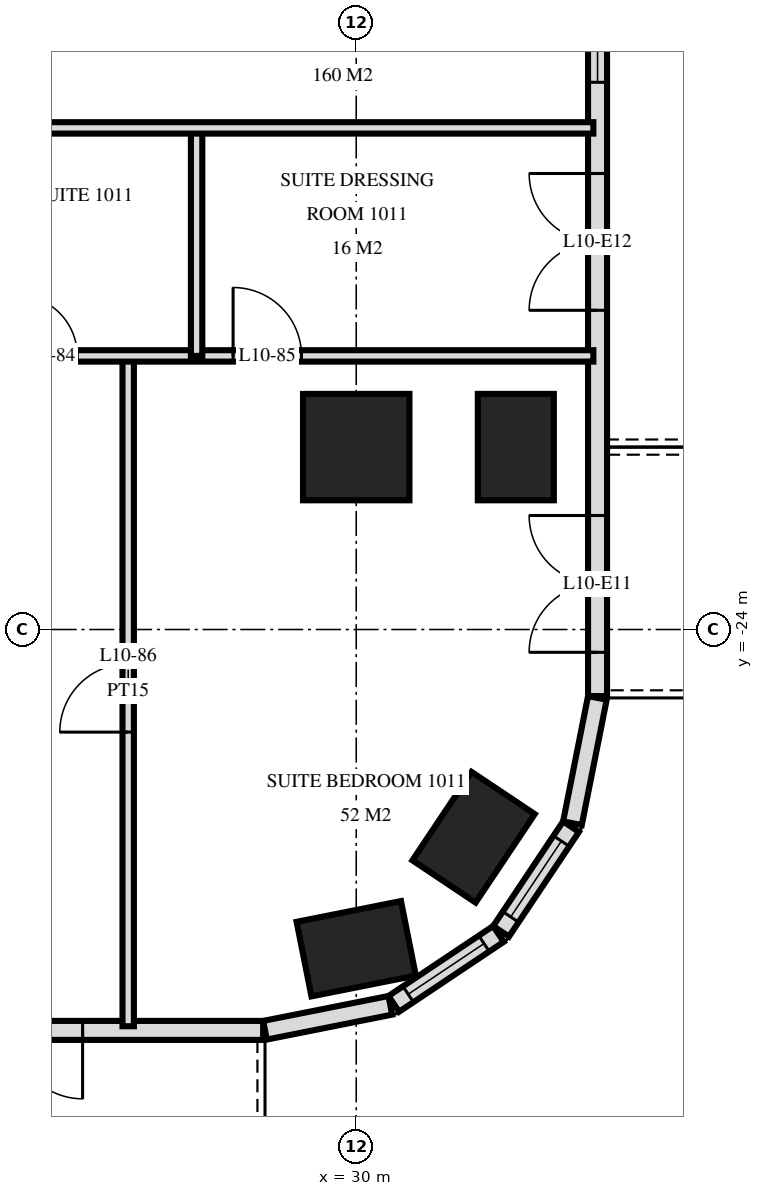
"""IFC4 building model, lengths in metres.
Left out: names, types, materials, properties, quantities, classifications, styles, units other than length and angle.
Written with IfcOpenShell. Run it as: python <this file> out.ifc"""

import sys

from ifc_helpers import new_model, si_unit, direction, frame, frame_2d, origin, origin_2d, place, context, subcontext, project, spatial, rectangle, extrude, element, fill, save


model = new_model("IFC4")
c1 = context("Model", 3, precision=1e-05, world=origin(), true_north=direction((0.0, 1.0)))
c2 = subcontext(c1, "Body", "Model", "MODEL_VIEW")
j1 = project(units=[si_unit("LENGTHUNIT", "METRE"), si_unit("PLANEANGLEUNIT", "RADIAN")], contexts=[c1])
p1 = place(None, origin())
s1 = spatial("IfcSite", under=j1, at=p1, CompositionType="ELEMENT")
p2 = place(p1, origin())
s2 = spatial("IfcBuilding", under=s1, at=p2, CompositionType="ELEMENT")
p3 = place(p2, frame((0.0, 0.0, 45.6)))
s3 = spatial("IfcBuildingStorey", under=s2, at=p3, CompositionType="ELEMENT", Elevation=45.6)
p4 = place(p3, frame((30.0, -28.2, 0.0), z_axis=(0.0, 0.0, 1.0), x_axis=(0.980792089743, 0.195056086032, 0.0)))
e1 = element("IfcColumn", 1, at=p4, inside=s3, PredefinedType="COLUMN", context=c2, shape_type="SweptSolid", body=[
    extrude(rectangle(XDim=1.4, YDim=1.0, at=origin_2d()), origin(), (0.0, 0.0, 1.0), 3.6),
])
p5 = place(p3, frame((30.0, -21.6, 0.0), z_axis=(0.0, 0.0, 1.0), x_axis=(1.0, 0.0, 0.0)))
e2 = element("IfcColumn", 2, at=p5, inside=s3, PredefinedType="COLUMN", context=c2, shape_type="SweptSolid", body=[
    extrude(rectangle(XDim=1.4, YDim=1.4, at=origin_2d()), origin(), (0.0, 0.0, 1.0), 3.6),
])
for number, where, z_axis, x_axis in (
    (3, (31.544, -26.733, 0.0), (0.0, 0.0, 1.0), (0.556, 0.831, 0.0)),
    (4, (32.1, -21.6, 0.0), (0.0, 0.0, 1.0), (0.0, 1.0, 0.0)),
):
    element("IfcColumn", number, at=place(p3, frame(where, z_axis=z_axis, x_axis=x_axis)), inside=s3, PredefinedType="COLUMN", context=c2, shape_type="SweptSolid", body=[
        extrude(rectangle(XDim=1.4, YDim=1.0, at=origin_2d()), origin(), (0.0, 0.0, 1.0), 3.6),
    ])
p6 = place(p3, frame((-28.775, -29.275, 0.0), z_axis=(0.0, 0.0, 1.0), x_axis=(1.0, 0.0, 0.0)))
e5 = element("IfcWall", 5, at=p6, inside=s3, PredefinedType="SOLIDWALL", context=c2, shape_type="SweptSolid", body=[
    extrude(rectangle(XDim=57.551, YDim=0.25, at=frame_2d((28.775, 0.0))), origin(), (0.0, 0.0, 1.0), 3.32),
])
p7 = place(p6, frame((0.575, 0.0, 0.0)))
e6 = element("IfcOpeningElement", 6, at=p7, cuts=e5, PredefinedType="OPENING", context=c2, shape_type="SweptSolid", body=[
    extrude(rectangle(XDim=1.8, YDim=2.4, at=frame_2d((0.9, 1.2))), frame((0.0, 0.135, 0.0), z_axis=(0.0, -1.0, 0.0), x_axis=(1.0, 0.0, 0.0)), (0.0, 0.0, 1.0), 0.27),
])
p8 = place(p6, frame((5.375, 0.0, 0.0)))
e7 = element("IfcOpeningElement", 7, at=p8, cuts=e5, PredefinedType="OPENING", context=c2, shape_type="SweptSolid", body=[
    extrude(rectangle(XDim=1.8, YDim=2.4, at=frame_2d((0.9, 1.2))), frame((0.0, 0.135, 0.0), z_axis=(0.0, -1.0, 0.0), x_axis=(1.0, 0.0, 0.0)), (0.0, 0.0, 1.0), 0.27),
])
p9 = place(p6, frame((8.075, 0.0, 0.3)))
e8 = element("IfcOpeningElement", 8, at=p9, cuts=e5, PredefinedType="OPENING", context=c2, shape_type="SweptSolid", body=[
    extrude(rectangle(XDim=2.4, YDim=2.1, at=frame_2d((1.2, 1.05))), frame((0.0, 0.135, 0.0), z_axis=(0.0, -1.0, 0.0), x_axis=(1.0, 0.0, 0.0)), (0.0, 0.0, 1.0), 0.27),
])
p10 = place(p6, frame((12.875, 0.0, 0.0)))
e9 = element("IfcOpeningElement", 9, at=p10, cuts=e5, PredefinedType="OPENING", context=c2, shape_type="SweptSolid", body=[
    extrude(rectangle(XDim=1.8, YDim=2.4, at=frame_2d((0.9, 1.2))), frame((0.0, 0.135, 0.0), z_axis=(0.0, -1.0, 0.0), x_axis=(1.0, 0.0, 0.0)), (0.0, 0.0, 1.0), 0.27),
])
p11 = place(p6, frame((17.375, 0.0, 0.0)))
e10 = element("IfcOpeningElement", 10, at=p11, cuts=e5, PredefinedType="OPENING", context=c2, shape_type="SweptSolid", body=[
    extrude(rectangle(XDim=1.8, YDim=2.4, at=frame_2d((0.9, 1.2))), frame((0.0, 0.135, 0.0), z_axis=(0.0, -1.0, 0.0), x_axis=(1.0, 0.0, 0.0)), (0.0, 0.0, 1.0), 0.27),
])
p12 = place(p6, frame((20.075, 0.0, 0.3)))
e11 = element("IfcOpeningElement", 11, at=p12, cuts=e5, PredefinedType="OPENING", context=c2, shape_type="SweptSolid", body=[
    extrude(rectangle(XDim=2.4, YDim=2.1, at=frame_2d((1.2, 1.05))), frame((0.0, 0.135, 0.0), z_axis=(0.0, -1.0, 0.0), x_axis=(1.0, 0.0, 0.0)), (0.0, 0.0, 1.0), 0.27),
])
p13 = place(p6, frame((23.075, 0.0, 0.3)))
e12 = element("IfcOpeningElement", 12, at=p13, cuts=e5, PredefinedType="OPENING", context=c2, shape_type="SweptSolid", body=[
    extrude(rectangle(XDim=2.4, YDim=2.1, at=frame_2d((1.2, 1.05))), frame((0.0, 0.135, 0.0), z_axis=(0.0, -1.0, 0.0), x_axis=(1.0, 0.0, 0.0)), (0.0, 0.0, 1.0), 0.27),
])
p14 = place(p6, frame((26.375, 0.0, 0.0)))
e13 = element("IfcOpeningElement", 13, at=p14, cuts=e5, PredefinedType="OPENING", context=c2, shape_type="SweptSolid", body=[
    extrude(rectangle(XDim=1.8, YDim=2.4, at=frame_2d((0.9, 1.2))), frame((0.0, 0.135, 0.0), z_axis=(0.0, -1.0, 0.0), x_axis=(1.0, 0.0, 0.0)), (0.0, 0.0, 1.0), 0.27),
])
p15 = place(p6, frame((29.075, 0.0, 0.3)))
e14 = element("IfcOpeningElement", 14, at=p15, cuts=e5, PredefinedType="OPENING", context=c2, shape_type="SweptSolid", body=[
    extrude(rectangle(XDim=2.4, YDim=2.1, at=frame_2d((1.2, 1.05))), frame((0.0, 0.135, 0.0), z_axis=(0.0, -1.0, 0.0), x_axis=(1.0, 0.0, 0.0)), (0.0, 0.0, 1.0), 0.27),
])
p16 = place(p6, frame((32.375, 0.0, 0.0)))
e15 = element("IfcOpeningElement", 15, at=p16, cuts=e5, PredefinedType="OPENING", context=c2, shape_type="SweptSolid", body=[
    extrude(rectangle(XDim=1.8, YDim=2.4, at=frame_2d((0.9, 1.2))), frame((0.0, 0.135, 0.0), z_axis=(0.0, -1.0, 0.0), x_axis=(1.0, 0.0, 0.0)), (0.0, 0.0, 1.0), 0.27),
])
p17 = place(p6, frame((35.375, 0.0, 0.0)))
e16 = element("IfcOpeningElement", 16, at=p17, cuts=e5, PredefinedType="OPENING", context=c2, shape_type="SweptSolid", body=[
    extrude(rectangle(XDim=1.8, YDim=2.4, at=frame_2d((0.9, 1.2))), frame((0.0, 0.135, 0.0), z_axis=(0.0, -1.0, 0.0), x_axis=(1.0, 0.0, 0.0)), (0.0, 0.0, 1.0), 0.27),
])
p18 = place(p6, frame((38.075, 0.0, 0.3)))
e17 = element("IfcOpeningElement", 17, at=p18, cuts=e5, PredefinedType="OPENING", context=c2, shape_type="SweptSolid", body=[
    extrude(rectangle(XDim=2.4, YDim=2.1, at=frame_2d((1.2, 1.05))), frame((0.0, 0.135, 0.0), z_axis=(0.0, -1.0, 0.0), x_axis=(1.0, 0.0, 0.0)), (0.0, 0.0, 1.0), 0.27),
])
p19 = place(p6, frame((41.075, 0.0, 0.3)))
e18 = element("IfcOpeningElement", 18, at=p19, cuts=e5, PredefinedType="OPENING", context=c2, shape_type="SweptSolid", body=[
    extrude(rectangle(XDim=2.4, YDim=2.1, at=frame_2d((1.2, 1.05))), frame((0.0, 0.135, 0.0), z_axis=(0.0, -1.0, 0.0), x_axis=(1.0, 0.0, 0.0)), (0.0, 0.0, 1.0), 0.27),
])
p20 = place(p6, frame((44.375, 0.0, 0.0)))
e19 = element("IfcOpeningElement", 19, at=p20, cuts=e5, PredefinedType="OPENING", context=c2, shape_type="SweptSolid", body=[
    extrude(rectangle(XDim=1.8, YDim=2.4, at=frame_2d((0.9, 1.2))), frame((0.0, 0.135, 0.0), z_axis=(0.0, -1.0, 0.0), x_axis=(1.0, 0.0, 0.0)), (0.0, 0.0, 1.0), 0.27),
])
p21 = place(p6, frame((47.075, 0.0, 0.3)))
e20 = element("IfcOpeningElement", 20, at=p21, cuts=e5, PredefinedType="OPENING", context=c2, shape_type="SweptSolid", body=[
    extrude(rectangle(XDim=2.4, YDim=2.1, at=frame_2d((1.2, 1.05))), frame((0.0, 0.135, 0.0), z_axis=(0.0, -1.0, 0.0), x_axis=(1.0, 0.0, 0.0)), (0.0, 0.0, 1.0), 0.27),
])
p22 = place(p6, frame((50.375, 0.0, 0.0)))
e21 = element("IfcOpeningElement", 21, at=p22, cuts=e5, PredefinedType="OPENING", context=c2, shape_type="SweptSolid", body=[
    extrude(rectangle(XDim=1.8, YDim=2.4, at=frame_2d((0.9, 1.2))), frame((0.0, 0.135, 0.0), z_axis=(0.0, -1.0, 0.0), x_axis=(1.0, 0.0, 0.0)), (0.0, 0.0, 1.0), 0.27),
])
p23 = place(p6, frame((53.375, 0.0, 0.0)))
e22 = element("IfcOpeningElement", 22, at=p23, cuts=e5, PredefinedType="OPENING", context=c2, shape_type="SweptSolid", body=[
    extrude(rectangle(XDim=1.8, YDim=2.4, at=frame_2d((0.9, 1.2))), frame((0.0, 0.135, 0.0), z_axis=(0.0, -1.0, 0.0), x_axis=(1.0, 0.0, 0.0)), (0.0, 0.0, 1.0), 0.27),
])
p24 = place(p3, frame((28.8, -29.273, 0.0), z_axis=(0.0, 0.0, 1.0), x_axis=(0.980775640221, 0.19513878023, 0.0)))
e23 = element("IfcWall", 23, at=p24, inside=s3, PredefinedType="SOLIDWALL", context=c2, shape_type="SweptSolid", body=[
    extrude(rectangle(XDim=1.681, YDim=0.25, at=frame_2d((0.841, 0.0))), origin(), (0.0, 0.0, 1.0), 3.32),
])
p25 = place(p3, frame((30.494, -28.926, 0.0), z_axis=(0.0, 0.0, 1.0), x_axis=(0.831482937015, 0.55555029066, 0.0)))
e24 = element("IfcWall", 24, at=p25, inside=s3, PredefinedType="SOLIDWALL", context=c2, shape_type="SweptSolid", body=[
    extrude(rectangle(XDim=1.656, YDim=0.25, at=frame_2d((0.828, 0.0))), origin(), (0.0, 0.0, 1.0), 3.32),
])
p26 = place(p25, frame((0.228, 0.0, 0.9)))
e25 = element("IfcOpeningElement", 25, at=p26, cuts=e24, PredefinedType="OPENING", context=c2, shape_type="SweptSolid", body=[
    extrude(rectangle(XDim=1.2, YDim=1.5, at=frame_2d((0.6, 0.75))), frame((0.0, 0.135, 0.0), z_axis=(0.0, -1.0, 0.0), x_axis=(1.0, 0.0, 0.0)), (0.0, 0.0, 1.0), 0.27),
])
p27 = place(p3, frame((31.906, -27.971, 0.0), z_axis=(0.0, 0.0, 1.0), x_axis=(0.55555029066, 0.831482937015, 0.0)))
e26 = element("IfcWall", 26, at=p27, inside=s3, PredefinedType="SOLIDWALL", context=c2, shape_type="SweptSolid", body=[
    extrude(rectangle(XDim=1.656, YDim=0.25, at=frame_2d((0.828, 0.0))), origin(), (0.0, 0.0, 1.0), 3.32),
])
p28 = place(p27, frame((0.228, 0.0, 0.9)))
e27 = element("IfcOpeningElement", 27, at=p28, cuts=e26, PredefinedType="OPENING", context=c2, shape_type="SweptSolid", body=[
    extrude(rectangle(XDim=1.2, YDim=1.5, at=frame_2d((0.6, 0.75))), frame((0.0, 0.135, 0.0), z_axis=(0.0, -1.0, 0.0), x_axis=(1.0, 0.0, 0.0)), (0.0, 0.0, 1.0), 0.27),
])
p29 = place(p3, frame((32.844, -26.549, 0.0), z_axis=(0.0, 0.0, 1.0), x_axis=(0.195166572128, 0.980770110232, 0.0)))
e28 = element("IfcWall", 28, at=p29, inside=s3, PredefinedType="SOLIDWALL", context=c2, shape_type="SweptSolid", body=[
    extrude(rectangle(XDim=1.681, YDim=0.25, at=frame_2d((0.841, 0.0))), origin(), (0.0, 0.0, 1.0), 3.32),
])
p30 = place(p3, frame((33.175, -24.875, 0.0), z_axis=(0.0, 0.0, 1.0), x_axis=(0.0, 1.0, 0.0)))
e29 = element("IfcWall", 29, at=p30, inside=s3, PredefinedType="SOLIDWALL", context=c2, shape_type="SweptSolid", body=[
    extrude(rectangle(XDim=21.551, YDim=0.25, at=frame_2d((10.775, 0.0))), origin(), (0.0, 0.0, 1.0), 3.32),
])
p31 = place(p30, frame((0.575, 0.0, 0.0)))
e30 = element("IfcOpeningElement", 30, at=p31, cuts=e29, PredefinedType="OPENING", context=c2, shape_type="SweptSolid", body=[
    extrude(rectangle(XDim=1.8, YDim=2.4, at=frame_2d((0.9, 1.2))), frame((0.0, 0.135, 0.0), z_axis=(0.0, -1.0, 0.0), x_axis=(1.0, 0.0, 0.0)), (0.0, 0.0, 1.0), 0.27),
])
p32 = place(p30, frame((5.075, 0.0, 0.0)))
e31 = element("IfcOpeningElement", 31, at=p32, cuts=e29, PredefinedType="OPENING", context=c2, shape_type="SweptSolid", body=[
    extrude(rectangle(XDim=1.8, YDim=2.4, at=frame_2d((0.9, 1.2))), frame((0.0, 0.135, 0.0), z_axis=(0.0, -1.0, 0.0), x_axis=(1.0, 0.0, 0.0)), (0.0, 0.0, 1.0), 0.27),
])
p33 = place(p30, frame((8.075, 0.0, 0.3)))
e32 = element("IfcOpeningElement", 32, at=p33, cuts=e29, PredefinedType="OPENING", context=c2, shape_type="SweptSolid", body=[
    extrude(rectangle(XDim=1.2, YDim=2.1, at=frame_2d((0.6, 1.05))), frame((0.0, 0.135, 0.0), z_axis=(0.0, -1.0, 0.0), x_axis=(1.0, 0.0, 0.0)), (0.0, 0.0, 1.0), 0.27),
])
p34 = place(p30, frame((13.1, 0.0, 0.0)))
e33 = element("IfcOpeningElement", 33, at=p34, cuts=e29, PredefinedType="OPENING", context=c2, shape_type="SweptSolid", body=[
    extrude(rectangle(XDim=1.8, YDim=2.4, at=frame_2d((0.9, 1.2))), frame((0.0, 0.135, 0.0), z_axis=(0.0, -1.0, 0.0), x_axis=(1.0, 0.0, 0.0)), (0.0, 0.0, 1.0), 0.27),
])
p35 = place(p3, frame((27.9, -20.4, 0.0), z_axis=(0.0, 0.0, 1.0), x_axis=(0.0, 1.0, 0.0)))
e34 = element("IfcWall", 34, at=p35, inside=s3, PredefinedType="PARTITIONING", context=c2, shape_type="SweptSolid", body=[
    extrude(rectangle(XDim=3.0, YDim=0.15, at=frame_2d((1.5, 0.0))), origin(), (0.0, 0.0, 1.0), 3.32),
])
p36 = place(p3, frame((27.0, -29.22, 0.0), z_axis=(0.0, 0.0, 1.0), x_axis=(0.0, 1.0, 0.0)))
e35 = element("IfcWall", 35, at=p36, inside=s3, PredefinedType="PARTITIONING", context=c2, shape_type="SweptSolid", body=[
    extrude(rectangle(XDim=8.82, YDim=0.15, at=frame_2d((4.41, 0.0))), origin(), (0.0, 0.0, 1.0), 3.32),
])
p37 = place(p36, frame((3.87, 0.0, 0.0)))
e36 = element("IfcOpeningElement", 36, at=p37, cuts=e35, PredefinedType="OPENING", context=c2, shape_type="SweptSolid", body=[
    extrude(rectangle(XDim=0.9, YDim=2.1, at=frame_2d((0.45, 1.05))), frame((0.0, 0.085, 0.0), z_axis=(0.0, -1.0, 0.0), x_axis=(1.0, 0.0, 0.0)), (0.0, 0.0, 1.0), 0.17),
])
p38 = place(p3, frame((24.9, -20.4, 0.0), z_axis=(0.0, 0.0, 1.0), x_axis=(1.0, 0.0, 0.0)))
e37 = element("IfcWall", 37, at=p38, inside=s3, PredefinedType="PARTITIONING", context=c2, shape_type="SweptSolid", body=[
    extrude(rectangle(XDim=8.22, YDim=0.15, at=frame_2d((4.11, 0.0))), origin(), (0.0, 0.0, 1.0), 3.32),
])
p39 = place(p38, frame((0.63, 0.0, 0.0)))
e38 = element("IfcOpeningElement", 38, at=p39, cuts=e37, PredefinedType="OPENING", context=c2, shape_type="SweptSolid", body=[
    extrude(rectangle(XDim=0.8, YDim=2.1, at=frame_2d((0.4, 1.05))), frame((0.0, 0.085, 0.0), z_axis=(0.0, -1.0, 0.0), x_axis=(1.0, 0.0, 0.0)), (0.0, 0.0, 1.0), 0.17),
])
p40 = place(p38, frame((3.48, 0.0, 0.0)))
e39 = element("IfcOpeningElement", 39, at=p40, cuts=e37, PredefinedType="OPENING", context=c2, shape_type="SweptSolid", body=[
    extrude(rectangle(XDim=0.9, YDim=2.1, at=frame_2d((0.45, 1.05))), frame((0.0, 0.085, 0.0), z_axis=(0.0, -1.0, 0.0), x_axis=(1.0, 0.0, 0.0)), (0.0, 0.0, 1.0), 0.17),
])
p41 = place(p3, frame((-33.12, -17.4, 0.0), z_axis=(0.0, 0.0, 1.0), x_axis=(1.0, 0.0, 0.0)))
e40 = element("IfcWall", 40, at=p41, inside=s3, PredefinedType="PARTITIONING", context=c2, shape_type="SweptSolid", body=[
    extrude(rectangle(XDim=66.24, YDim=0.15, at=frame_2d((33.12, 0.0))), origin(), (0.0, 0.0, 1.0), 3.32),
])
p42 = place(p41, frame((9.27, 0.0, 0.0)))
e41 = element("IfcOpeningElement", 41, at=p42, cuts=e40, PredefinedType="OPENING", context=c2, shape_type="SweptSolid", body=[
    extrude(rectangle(XDim=1.0, YDim=2.1, at=frame_2d((0.5, 1.05))), frame((0.0, 0.085, 0.0), z_axis=(0.0, -1.0, 0.0), x_axis=(1.0, 0.0, 0.0)), (0.0, 0.0, 1.0), 0.17),
])
p43 = place(p41, frame((13.97, 0.0, 0.0)))
e42 = element("IfcOpeningElement", 42, at=p43, cuts=e40, PredefinedType="OPENING", context=c2, shape_type="SweptSolid", body=[
    extrude(rectangle(XDim=1.0, YDim=2.1, at=frame_2d((0.5, 1.05))), frame((0.0, 0.085, 0.0), z_axis=(0.0, -1.0, 0.0), x_axis=(1.0, 0.0, 0.0)), (0.0, 0.0, 1.0), 0.17),
])
p44 = place(p41, frame((17.62, 0.0, 0.0)))
e43 = element("IfcOpeningElement", 43, at=p44, cuts=e40, PredefinedType="OPENING", context=c2, shape_type="SweptSolid", body=[
    extrude(rectangle(XDim=1.0, YDim=2.1, at=frame_2d((0.5, 1.05))), frame((0.0, 0.085, 0.0), z_axis=(0.0, -1.0, 0.0), x_axis=(1.0, 0.0, 0.0)), (0.0, 0.0, 1.0), 0.17),
])
p45 = place(p41, frame((21.27, 0.0, 0.0)))
e44 = element("IfcOpeningElement", 44, at=p45, cuts=e40, PredefinedType="OPENING", context=c2, shape_type="SweptSolid", body=[
    extrude(rectangle(XDim=1.0, YDim=2.1, at=frame_2d((0.5, 1.05))), frame((0.0, 0.085, 0.0), z_axis=(0.0, -1.0, 0.0), x_axis=(1.0, 0.0, 0.0)), (0.0, 0.0, 1.0), 0.17),
])
p46 = place(p41, frame((25.97, 0.0, 0.0)))
e45 = element("IfcOpeningElement", 45, at=p46, cuts=e40, PredefinedType="OPENING", context=c2, shape_type="SweptSolid", body=[
    extrude(rectangle(XDim=1.0, YDim=2.1, at=frame_2d((0.5, 1.05))), frame((0.0, 0.085, 0.0), z_axis=(0.0, -1.0, 0.0), x_axis=(1.0, 0.0, 0.0)), (0.0, 0.0, 1.0), 0.17),
])
p47 = place(p41, frame((35.62, 0.0, 0.0)))
e46 = element("IfcOpeningElement", 46, at=p47, cuts=e40, PredefinedType="OPENING", context=c2, shape_type="SweptSolid", body=[
    extrude(rectangle(XDim=1.0, YDim=2.1, at=frame_2d((0.5, 1.05))), frame((0.0, 0.085, 0.0), z_axis=(0.0, -1.0, 0.0), x_axis=(1.0, 0.0, 0.0)), (0.0, 0.0, 1.0), 0.17),
])
p48 = place(p41, frame((40.97, 0.0, 0.0)))
e47 = element("IfcOpeningElement", 47, at=p48, cuts=e40, PredefinedType="OPENING", context=c2, shape_type="SweptSolid", body=[
    extrude(rectangle(XDim=1.0, YDim=2.1, at=frame_2d((0.5, 1.05))), frame((0.0, 0.085, 0.0), z_axis=(0.0, -1.0, 0.0), x_axis=(1.0, 0.0, 0.0)), (0.0, 0.0, 1.0), 0.17),
])
p49 = place(p41, frame((42.27, 0.0, 0.0)))
e48 = element("IfcOpeningElement", 48, at=p49, cuts=e40, PredefinedType="OPENING", context=c2, shape_type="SweptSolid", body=[
    extrude(rectangle(XDim=1.0, YDim=2.1, at=frame_2d((0.5, 1.05))), frame((0.0, 0.085, 0.0), z_axis=(0.0, -1.0, 0.0), x_axis=(1.0, 0.0, 0.0)), (0.0, 0.0, 1.0), 0.17),
])
p50 = place(p41, frame((49.72, 0.0, 0.0)))
e49 = element("IfcOpeningElement", 49, at=p50, cuts=e40, PredefinedType="OPENING", context=c2, shape_type="SweptSolid", body=[
    extrude(rectangle(XDim=1.0, YDim=2.1, at=frame_2d((0.5, 1.05))), frame((0.0, 0.085, 0.0), z_axis=(0.0, -1.0, 0.0), x_axis=(1.0, 0.0, 0.0)), (0.0, 0.0, 1.0), 0.17),
])
p51 = place(p41, frame((51.27, 0.0, 0.0)))
e50 = element("IfcOpeningElement", 50, at=p51, cuts=e40, PredefinedType="OPENING", context=c2, shape_type="SweptSolid", body=[
    extrude(rectangle(XDim=1.0, YDim=2.1, at=frame_2d((0.5, 1.05))), frame((0.0, 0.085, 0.0), z_axis=(0.0, -1.0, 0.0), x_axis=(1.0, 0.0, 0.0)), (0.0, 0.0, 1.0), 0.17),
])
p52 = place(p41, frame((4.42, 0.0, 0.0)))
e51 = element("IfcOpeningElement", 51, at=p52, cuts=e40, PredefinedType="OPENING", context=c2, shape_type="SweptSolid", body=[
    extrude(rectangle(XDim=1.0, YDim=2.1, at=frame_2d((0.5, 1.05))), frame((0.0, 0.085, 0.0), z_axis=(0.0, -1.0, 0.0), x_axis=(1.0, 0.0, 0.0)), (0.0, 0.0, 1.0), 0.17),
])
p53 = place(p41, frame((54.82, 0.0, 0.0)))
e52 = element("IfcOpeningElement", 52, at=p53, cuts=e40, PredefinedType="OPENING", context=c2, shape_type="SweptSolid", body=[
    extrude(rectangle(XDim=1.0, YDim=2.1, at=frame_2d((0.5, 1.05))), frame((0.0, 0.085, 0.0), z_axis=(0.0, -1.0, 0.0), x_axis=(1.0, 0.0, 0.0)), (0.0, 0.0, 1.0), 0.17),
])
p54 = place(p26, origin())
e53 = element("IfcWindow", 53, at=p54, inside=s3, PartitioningType="SINGLE_PANEL", PredefinedType="WINDOW", context=c2, shape_type="SweptSolid", body=[
    extrude(rectangle(XDim=1.2, YDim=1.5, at=frame_2d((0.6, 0.75))), frame((0.0, 0.03, 0.0), z_axis=(0.0, -1.0, 0.0), x_axis=(1.0, 0.0, 0.0)), (0.0, 0.0, 1.0), 0.06),
])
fill(e25, e53)
p55 = place(p28, origin())
e54 = element("IfcWindow", 54, at=p55, inside=s3, PartitioningType="SINGLE_PANEL", PredefinedType="WINDOW", context=c2, shape_type="SweptSolid", body=[
    extrude(rectangle(XDim=1.2, YDim=1.5, at=frame_2d((0.6, 0.75))), frame((0.0, 0.03, 0.0), z_axis=(0.0, -1.0, 0.0), x_axis=(1.0, 0.0, 0.0)), (0.0, 0.0, 1.0), 0.06),
])
fill(e27, e54)
p56 = place(p23, frame((0.9, 0.0, 0.0), z_axis=(0.0, 0.0, 1.0), x_axis=(-1.0, 0.0, 0.0)))
e55 = element("IfcDoor", 55, at=p56, inside=s3, OperationType="DOUBLE_DOOR_SINGLE_SWING", PredefinedType="DOOR", context=c2, shape_type="SweptSolid", body=[
    extrude(rectangle(XDim=1.8, YDim=2.4, at=frame_2d((0.0, 1.2))), frame((0.0, -0.025, 0.0), z_axis=(0.0, 1.0, 0.0), x_axis=(-1.0, 0.0, 0.0)), (0.0, 0.0, 1.0), 0.05),
])
fill(e22, e55)
p57 = place(p31, origin())
e56 = element("IfcDoor", 56, at=p57, inside=s3, OperationType="DOUBLE_DOOR_SINGLE_SWING", PredefinedType="DOOR", context=c2, shape_type="SweptSolid", body=[
    extrude(rectangle(XDim=1.8, YDim=2.4, at=frame_2d((0.9, 1.2))), frame((0.0, 0.025, 0.0), z_axis=(0.0, -1.0, 0.0), x_axis=(1.0, 0.0, 0.0)), (0.0, 0.0, 1.0), 0.05),
])
fill(e30, e56)
p58 = place(p32, origin())
e57 = element("IfcDoor", 57, at=p58, inside=s3, OperationType="DOUBLE_DOOR_SINGLE_SWING", PredefinedType="DOOR", context=c2, shape_type="SweptSolid", body=[
    extrude(rectangle(XDim=1.8, YDim=2.4, at=frame_2d((0.9, 1.2))), frame((0.0, 0.025, 0.0), z_axis=(0.0, -1.0, 0.0), x_axis=(1.0, 0.0, 0.0)), (0.0, 0.0, 1.0), 0.05),
])
fill(e31, e57)
p59 = place(p33, origin())
e58 = element("IfcWindow", 58, at=p59, inside=s3, PartitioningType="SINGLE_PANEL", PredefinedType="WINDOW", context=c2, shape_type="SweptSolid", body=[
    extrude(rectangle(XDim=1.2, YDim=2.1, at=frame_2d((0.6, 1.05))), frame((0.0, 0.03, 0.0), z_axis=(0.0, -1.0, 0.0), x_axis=(1.0, 0.0, 0.0)), (0.0, 0.0, 1.0), 0.06),
])
fill(e32, e58)
p60 = place(p39, origin())
e59 = element("IfcDoor", 59, at=p60, inside=s3, OperationType="SINGLE_SWING_RIGHT", PredefinedType="DOOR", context=c2, shape_type="SweptSolid", body=[
    extrude(rectangle(XDim=0.8, YDim=2.1, at=frame_2d((0.4, 1.05))), frame((0.0, 0.025, 0.0), z_axis=(0.0, -1.0, 0.0), x_axis=(1.0, 0.0, 0.0)), (0.0, 0.0, 1.0), 0.05),
])
fill(e38, e59)
p61 = place(p40, origin())
e60 = element("IfcDoor", 60, at=p61, inside=s3, OperationType="SINGLE_SWING_RIGHT", PredefinedType="DOOR", context=c2, shape_type="SweptSolid", body=[
    extrude(rectangle(XDim=0.9, YDim=2.1, at=frame_2d((0.45, 1.05))), frame((0.0, 0.025, 0.0), z_axis=(0.0, -1.0, 0.0), x_axis=(1.0, 0.0, 0.0)), (0.0, 0.0, 1.0), 0.05),
])
fill(e39, e60)
p62 = place(p37, origin())
e61 = element("IfcDoor", 61, at=p62, inside=s3, OperationType="SINGLE_SWING_RIGHT", PredefinedType="DOOR", context=c2, shape_type="SweptSolid", body=[
    extrude(rectangle(XDim=0.9, YDim=2.1, at=frame_2d((0.45, 1.05))), frame((0.0, 0.025, 0.0), z_axis=(0.0, -1.0, 0.0), x_axis=(1.0, 0.0, 0.0)), (0.0, 0.0, 1.0), 0.05),
])
fill(e36, e61)
save(model, sys.argv[1])
